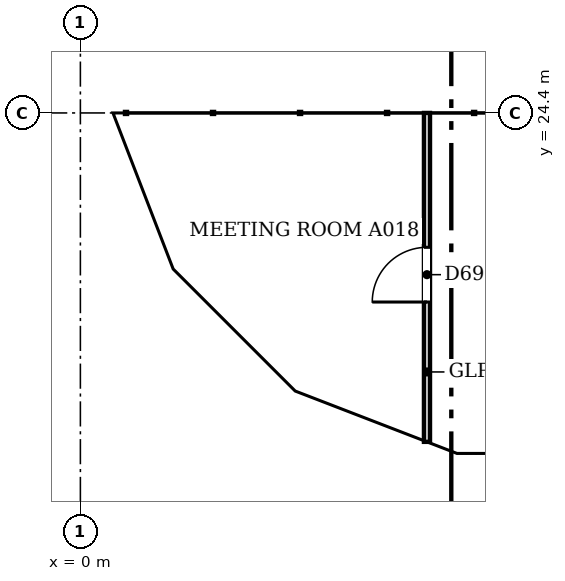
"""IFC4 building model, lengths in metres.
Left out: names, types, materials, properties, quantities, classifications, styles, units other than length and angle.
Written with IfcOpenShell. Run it as: python <this file> out.ifc"""

import sys

from ifc_helpers import new_model, si_unit, direction, frame, frame_2d, origin, place, context, subcontext, project, spatial, polyline, rectangle, outline, extrude, faceted_brep, source, transform, mapped, element, fill, save


model = new_model("IFC4")
c1 = context("Model", 3, precision=1e-05, world=origin(), true_north=direction((0.0, 1.0)))
c2 = subcontext(c1, "Body", "Model", "MODEL_VIEW")
j1 = project(units=[si_unit("LENGTHUNIT", "METRE"), si_unit("PLANEANGLEUNIT", "RADIAN")], contexts=[c1])
p1 = place(None, origin())
s1 = spatial("IfcSite", under=j1, at=p1, CompositionType="ELEMENT")
p2 = place(p1, origin())
s2 = spatial("IfcBuilding", under=s1, at=p2, CompositionType="ELEMENT")
p3 = place(p2, frame((0.0, 0.0, 41.0)))
s3 = spatial("IfcBuildingStorey", under=s2, at=p3, CompositionType="ELEMENT", Elevation=41.0)
m1 = source(origin(), c2, "Body", "Brep", [
    faceted_brep([(3.05, -0.25, 0.0), (6.053, -0.25, 3.8), (3.05, -0.25, 7.6), (0.0, -0.25, 3.8), (0.0, 0.25, 3.8), (3.05, 0.25, 7.6), (6.007, 0.25, 3.859), (6.007, 0.25, 3.741), (3.05, 0.25, 0.0), (6.053, 0.0, 3.8)], [[[0, 1, 2, 3]], [[4, 5, 6, 7, 8]], [[8, 7, 9, 1, 0]], [[6, 5, 2, 1, 9]], [[5, 4, 3, 2]], [[4, 8, 0, 3]], [[9, 7, 6]]]),
])
p4 = place(p3, frame((0.25, 30.5, -3.8), z_axis=(0.0, 0.0, 1.0), x_axis=(0.0, -1.0, 0.0)))
e1 = element("IfcWall", 1, at=p4, inside=s3, PredefinedType="SOLIDWALL", context=c2, shape_type="MappedRepresentation", body=[
    mapped(m1, transform((0.0, 0.0, 0.0), scale=1.0)),
])
m2 = source(origin(), c2, "Body", "SweptSolid", [
    extrude(outline(polyline([(3.049, 0.401), (5.735, 3.8), (3.049, 7.199), (0.321, 3.8), (3.049, 0.401)])), frame((0.0, 0.26, 0.0), z_axis=(0.0, -1.0, 0.0), x_axis=(1.0, 0.0, 0.0)), (0.0, 0.0, 1.0), 0.52),
])
p5 = place(p4, origin())
e2 = element("IfcOpeningElement", 2, at=p5, cuts=e1, PredefinedType="OPENING", context=c2, shape_type="MappedRepresentation", body=[
    mapped(m2, transform((0.0, 0.0, 0.0), scale=1.0)),
])
m3 = source(origin(), c2, "Body", "Brep", [
    faceted_brep([(2.95, -0.25, 0.0), (3.003, -0.25, 0.068), (3.003, -0.25, 7.532), (2.95, -0.25, 7.6), (0.0, -0.25, 3.8), (0.047, 0.25, 3.86), (2.898, 0.25, 7.532), (2.898, 0.25, 0.068), (0.047, 0.25, 3.74), (2.95, 0.0, 0.0), (2.95, 0.0, 7.6), (0.0, 0.0, 3.8)], [[[0, 1, 2, 3, 4]], [[5, 6, 7, 8]], [[1, 0, 9]], [[10, 3, 2]], [[6, 5, 11, 4, 3, 10]], [[8, 7, 9, 0, 4, 11]], [[8, 11, 5]], [[1, 9, 7, 6, 10, 2]]]),
])
p6 = place(p3, frame((0.25, 24.447, -3.8), z_axis=(0.0, 0.0, 1.0), x_axis=(0.35992665181, -0.932980602862, 0.0)))
e3 = element("IfcWall", 3, at=p6, inside=s3, PredefinedType="SOLIDWALL", context=c2, shape_type="MappedRepresentation", body=[
    mapped(m3, transform((0.0, 0.0, 0.0), scale=1.0)),
])
m4 = source(origin(), c2, "Body", "SweptSolid", [
    extrude(outline(polyline([(2.75, 6.935), (0.316, 3.8), (2.75, 0.665), (2.75, 6.935)])), frame((0.0, 0.26, 0.0), z_axis=(0.0, -1.0, 0.0), x_axis=(1.0, 0.0, 0.0)), (0.0, 0.0, 1.0), 0.52),
])
p7 = place(p6, origin())
e4 = element("IfcOpeningElement", 4, at=p7, cuts=e3, PredefinedType="OPENING", context=c2, shape_type="MappedRepresentation", body=[
    mapped(m4, transform((0.0, 0.0, 0.0), scale=1.0)),
])
m5 = source(origin(), c2, "Body", "Brep", [
    faceted_brep([(0.053, -0.25, 0.0), (2.997, -0.25, 3.8), (0.053, -0.25, 7.6), (0.0, -0.25, 7.532), (0.0, -0.25, 0.068), (0.106, 0.25, 7.532), (2.944, 0.25, 3.868), (2.944, 0.25, 3.732), (0.106, 0.25, 0.068), (2.997, 0.0, 3.8), (0.053, 0.0, 0.0), (0.053, 0.0, 7.6)], [[[0, 1, 2, 3, 4]], [[5, 6, 7, 8]], [[8, 7, 9, 1, 0, 10]], [[6, 5, 11, 2, 1, 9]], [[3, 2, 11]], [[10, 0, 4]], [[8, 10, 4, 3, 11, 5]], [[9, 7, 6]]]),
])
p8 = place(p3, frame((1.274, 21.731, -3.8), z_axis=(0.0, 0.0, 1.0), x_axis=(0.707147509625, -0.707066050402, 0.0)))
e5 = element("IfcWall", 5, at=p8, inside=s3, PredefinedType="SOLIDWALL", context=c2, shape_type="MappedRepresentation", body=[
    mapped(m5, transform((0.0, 0.0, 0.0), scale=1.0)),
])
m6 = source(origin(), c2, "Body", "SweptSolid", [
    extrude(outline(polyline([(0.253, 0.666), (2.681, 3.8), (0.253, 6.934), (0.253, 0.666)])), frame((0.0, 0.26, 0.0), z_axis=(0.0, -1.0, 0.0), x_axis=(1.0, 0.0, 0.0)), (0.0, 0.0, 1.0), 0.52),
])
p9 = place(p8, origin())
e6 = element("IfcOpeningElement", 6, at=p9, cuts=e5, PredefinedType="OPENING", context=c2, shape_type="MappedRepresentation", body=[
    mapped(m6, transform((0.0, 0.0, 0.0), scale=1.0)),
])
m7 = source(origin(), c2, "Body", "Brep", [
    faceted_brep([(2.95, -0.25, 0.0), (2.997, -0.25, 0.059), (2.997, -0.25, 7.541), (2.95, -0.25, 7.6), (0.0, -0.25, 3.8), (0.053, 0.25, 3.868), (2.904, 0.25, 7.54), (2.904, 0.25, 0.06), (0.053, 0.25, 3.732), (2.95, 0.0, 0.0), (2.95, 0.0, 7.6), (0.0, 0.0, 3.8)], [[[0, 1, 2, 3, 4]], [[5, 6, 7, 8]], [[1, 0, 9]], [[10, 3, 2]], [[6, 5, 11, 4, 3, 10]], [[8, 7, 9, 0, 4, 11]], [[8, 11, 5]], [[1, 9, 7, 6, 10, 2]]]),
])
p10 = place(p3, frame((3.394, 19.612, -3.8), z_axis=(0.0, 0.0, 1.0), x_axis=(0.932990326376, -0.359901446078, 0.0)))
e7 = element("IfcWall", 7, at=p10, inside=s3, PredefinedType="SOLIDWALL", context=c2, shape_type="MappedRepresentation", body=[
    mapped(m7, transform((0.0, 0.0, 0.0), scale=1.0)),
])
p11 = place(p10, origin())
e8 = element("IfcOpeningElement", 8, at=p11, cuts=e7, PredefinedType="OPENING", context=c2, shape_type="MappedRepresentation", body=[
    mapped(m4, transform((0.0, 0.0, 0.0), scale=1.0)),
])
m8 = source(origin(), c2, "Body", "Brep", [
    faceted_brep([(0.047, -0.25, 0.0), (3.05, -0.25, 3.8), (0.047, -0.25, 7.6), (0.0, -0.25, 7.54), (0.0, -0.25, 0.06), (0.093, 0.25, 7.541), (3.05, 0.25, 3.8), (0.093, 0.25, 0.059), (0.047, 0.0, 0.0), (0.047, 0.0, 7.6)], [[[0, 1, 2, 3, 4]], [[5, 6, 7]], [[7, 6, 1, 0, 8]], [[6, 5, 9, 2, 1]], [[3, 2, 9]], [[8, 0, 4]], [[7, 8, 4, 3, 9, 5]]]),
])
p12 = place(p3, frame((6.1, 18.55, -3.8), z_axis=(0.0, 0.0, 1.0), x_axis=(1.0, 0.0, 0.0)))
e9 = element("IfcWall", 9, at=p12, inside=s3, PredefinedType="SOLIDWALL", context=c2, shape_type="MappedRepresentation", body=[
    mapped(m8, transform((0.0, 0.0, 0.0), scale=1.0)),
])
m9 = source(origin(), c2, "Body", "SweptSolid", [
    extrude(outline(polyline([(0.247, 0.656), (2.731, 3.8), (0.247, 6.944), (0.247, 0.656)])), frame((0.0, 0.26, 0.0), z_axis=(0.0, -1.0, 0.0), x_axis=(1.0, 0.0, 0.0)), (0.0, 0.0, 1.0), 0.52),
])
p13 = place(p12, origin())
e10 = element("IfcOpeningElement", 10, at=p13, cuts=e9, PredefinedType="OPENING", context=c2, shape_type="MappedRepresentation", body=[
    mapped(m9, transform((0.0, 0.0, 0.0), scale=1.0)),
])
p14 = place(p2, frame((0.0, 0.0, 44.8)))
s4 = spatial("IfcBuildingStorey", under=s2, at=p14, CompositionType="ELEMENT", Elevation=44.8)
m10 = source(origin(), c2, "Body", "Brep", [
    faceted_brep([(3.003, -0.25, 0.0), (3.05, -0.25, 0.06), (3.05, -0.25, 7.54), (3.003, -0.25, 7.6), (0.0, -0.25, 3.8), (0.0, 0.25, 3.8), (2.957, 0.25, 7.541), (2.957, 0.25, 0.059), (3.003, 0.0, 0.0), (3.003, 0.0, 7.6)], [[[0, 1, 2, 3, 4]], [[5, 6, 7]], [[1, 0, 8]], [[9, 3, 2]], [[6, 5, 4, 3, 9]], [[5, 7, 8, 0, 4]], [[1, 8, 7, 6, 9, 2]]]),
])
p15 = place(p14, frame((0.25, 27.45, -3.8), z_axis=(0.0, 0.0, 1.0), x_axis=(0.0, -1.0, 0.0)))
e11 = element("IfcWall", 11, at=p15, inside=s4, PredefinedType="SOLIDWALL", context=c2, shape_type="MappedRepresentation", body=[
    mapped(m10, transform((0.0, 0.0, 0.0), scale=1.0)),
])
m11 = source(origin(), c2, "Body", "SweptSolid", [
    extrude(outline(polyline([(2.803, 6.944), (0.319, 3.8), (2.803, 0.656), (2.803, 6.944)])), frame((0.0, 0.26, 0.0), z_axis=(0.0, -1.0, 0.0), x_axis=(1.0, 0.0, 0.0)), (0.0, 0.0, 1.0), 0.52),
])
p16 = place(p15, origin())
e12 = element("IfcOpeningElement", 12, at=p16, cuts=e11, PredefinedType="OPENING", context=c2, shape_type="MappedRepresentation", body=[
    mapped(m11, transform((0.0, 0.0, 0.0), scale=1.0)),
])
m12 = source(origin(), c2, "Body", "Brep", [
    faceted_brep([(0.047, -0.25, 0.0), (2.997, -0.25, 3.8), (0.047, -0.25, 7.6), (0.0, -0.25, 7.541), (0.0, -0.25, 0.059), (0.093, 0.25, 7.54), (2.944, 0.25, 3.868), (2.944, 0.25, 3.732), (0.093, 0.25, 0.06), (2.997, 0.0, 3.8), (0.047, 0.0, 0.0), (0.047, 0.0, 7.6)], [[[0, 1, 2, 3, 4]], [[5, 6, 7, 8]], [[8, 7, 9, 1, 0, 10]], [[6, 5, 11, 2, 1, 9]], [[3, 2, 11]], [[10, 0, 4]], [[8, 10, 4, 3, 11, 5]], [[9, 7, 6]]]),
])
p17 = place(p14, frame((0.233, 24.49, -3.8), z_axis=(0.0, 0.0, 1.0), x_axis=(0.359901446078, -0.932990326376, 0.0)))
e13 = element("IfcWall", 13, at=p17, inside=s4, PredefinedType="SOLIDWALL", context=c2, shape_type="MappedRepresentation", body=[
    mapped(m12, transform((0.0, 0.0, 0.0), scale=1.0)),
])
m13 = source(origin(), c2, "Body", "SweptSolid", [
    extrude(outline(polyline([(0.247, 0.665), (2.681, 3.8), (0.247, 6.935), (0.247, 0.665)])), frame((0.0, 0.26, 0.0), z_axis=(0.0, -1.0, 0.0), x_axis=(1.0, 0.0, 0.0)), (0.0, 0.0, 1.0), 0.52),
])
p18 = place(p17, origin())
e14 = element("IfcOpeningElement", 14, at=p18, cuts=e13, PredefinedType="OPENING", context=c2, shape_type="MappedRepresentation", body=[
    mapped(m13, transform((0.0, 0.0, 0.0), scale=1.0)),
])
m14 = source(origin(), c2, "Body", "Brep", [
    faceted_brep([(2.944, -0.25, 0.0), (2.997, -0.25, 0.068), (2.997, -0.25, 7.532), (2.944, -0.25, 7.6), (0.0, -0.25, 3.8), (0.053, 0.25, 3.868), (2.891, 0.25, 7.532), (2.891, 0.25, 0.068), (0.053, 0.25, 3.732), (2.944, 0.0, 0.0), (2.944, 0.0, 7.6), (0.0, 0.0, 3.8)], [[[0, 1, 2, 3, 4]], [[5, 6, 7, 8]], [[1, 0, 9]], [[10, 3, 2]], [[6, 5, 11, 4, 3, 10]], [[8, 7, 9, 0, 4, 11]], [[8, 11, 5]], [[1, 9, 7, 6, 10, 2]]]),
])
p19 = place(p14, frame((1.312, 21.694, -3.8), z_axis=(0.0, 0.0, 1.0), x_axis=(0.707066050402, -0.707147509625, 0.0)))
e15 = element("IfcWall", 15, at=p19, inside=s4, PredefinedType="SOLIDWALL", context=c2, shape_type="MappedRepresentation", body=[
    mapped(m14, transform((0.0, 0.0, 0.0), scale=1.0)),
])
m15 = source(origin(), c2, "Body", "SweptSolid", [
    extrude(outline(polyline([(2.744, 6.934), (0.316, 3.8), (2.744, 0.666), (2.744, 6.934)])), frame((0.0, 0.26, 0.0), z_axis=(0.0, -1.0, 0.0), x_axis=(1.0, 0.0, 0.0)), (0.0, 0.0, 1.0), 0.52),
])
p20 = place(p19, origin())
e16 = element("IfcOpeningElement", 16, at=p20, cuts=e15, PredefinedType="OPENING", context=c2, shape_type="MappedRepresentation", body=[
    mapped(m15, transform((0.0, 0.0, 0.0), scale=1.0)),
])
m16 = source(origin(), c2, "Body", "Brep", [
    faceted_brep([(0.053, -0.25, 0.0), (3.003, -0.25, 3.8), (0.053, -0.25, 7.6), (0.0, -0.25, 7.532), (0.0, -0.25, 0.068), (0.106, 0.25, 7.532), (2.957, 0.25, 3.86), (2.957, 0.25, 3.74), (0.106, 0.25, 0.068), (3.003, 0.0, 3.8), (0.053, 0.0, 0.0), (0.053, 0.0, 7.6)], [[[0, 1, 2, 3, 4]], [[5, 6, 7, 8]], [[8, 7, 9, 1, 0, 10]], [[6, 5, 11, 2, 1, 9]], [[3, 2, 11]], [[10, 0, 4]], [[8, 10, 4, 3, 11, 5]], [[9, 7, 6]]]),
])
p21 = place(p14, frame((3.344, 19.631, -3.8), z_axis=(0.0, 0.0, 1.0), x_axis=(0.933007896601, -0.359855894603, 0.0)))
e17 = element("IfcWall", 17, at=p21, inside=s4, PredefinedType="SOLIDWALL", context=c2, shape_type="MappedRepresentation", body=[
    mapped(m16, transform((0.0, 0.0, 0.0), scale=1.0)),
])
m17 = source(origin(), c2, "Body", "SweptSolid", [
    extrude(outline(polyline([(0.253, 0.665), (2.687, 3.8), (0.253, 6.935), (0.253, 0.665)])), frame((0.0, 0.26, 0.0), z_axis=(0.0, -1.0, 0.0), x_axis=(1.0, 0.0, 0.0)), (0.0, 0.0, 1.0), 0.52),
])
p22 = place(p21, origin())
e18 = element("IfcOpeningElement", 18, at=p22, cuts=e17, PredefinedType="OPENING", context=c2, shape_type="MappedRepresentation", body=[
    mapped(m17, transform((0.0, 0.0, 0.0), scale=1.0)),
])
m18 = source(origin(), c2, "Body", "Brep", [
    faceted_brep([(3.003, -0.25, 0.0), (6.053, -0.25, 3.8), (3.003, -0.25, 7.6), (0.0, -0.25, 3.8), (0.047, 0.25, 3.859), (3.003, 0.25, 7.6), (6.053, 0.25, 3.8), (3.003, 0.25, 0.0), (0.047, 0.25, 3.741), (0.0, 0.0, 3.8)], [[[0, 1, 2, 3]], [[4, 5, 6, 7, 8]], [[7, 6, 1, 0]], [[6, 5, 2, 1]], [[5, 4, 9, 3, 2]], [[8, 7, 0, 3, 9]], [[8, 9, 4]]]),
])
p23 = place(p14, frame((6.146, 18.55, -3.8), z_axis=(0.0, 0.0, 1.0), x_axis=(1.0, 0.0, 0.0)))
e19 = element("IfcWall", 19, at=p23, inside=s4, PredefinedType="SOLIDWALL", context=c2, shape_type="MappedRepresentation", body=[
    mapped(m18, transform((0.0, 0.0, 0.0), scale=1.0)),
])
m19 = source(origin(), c2, "Body", "SweptSolid", [
    extrude(outline(polyline([(3.005, 0.401), (5.733, 3.8), (3.005, 7.199), (0.319, 3.8), (3.005, 0.401)])), frame((0.0, 0.26, 0.0), z_axis=(0.0, -1.0, 0.0), x_axis=(1.0, 0.0, 0.0)), (0.0, 0.0, 1.0), 0.52),
])
p24 = place(p23, origin())
e20 = element("IfcOpeningElement", 20, at=p24, cuts=e19, PredefinedType="OPENING", context=c2, shape_type="MappedRepresentation", body=[
    mapped(m19, transform((0.0, 0.0, 0.0), scale=1.0)),
])
p25 = place(p3, frame((5.7, 18.99, 0.0), z_axis=(0.0, 0.0, 1.0), x_axis=(0.0, 1.0, 0.0)))
e21 = element("IfcWall", 21, at=p25, inside=s3, PredefinedType="PARTITIONING", context=c2, shape_type="SweptSolid", body=[
    extrude(rectangle(XDim=5.41, YDim=0.1, at=frame_2d((2.705, 0.0))), origin(), (0.0, 0.0, 1.0), 3.067),
])
m20 = source(origin(), c2, "Body", "SweptSolid", [
    extrude(rectangle(XDim=0.9, YDim=2.1, at=frame_2d((0.45, 1.05))), frame((0.0, 0.06, 0.0), z_axis=(0.0, -1.0, 0.0), x_axis=(1.0, 0.0, 0.0)), (0.0, 0.0, 1.0), 0.12),
])
p26 = place(p25, frame((2.3, 0.0, 0.0)))
e22 = element("IfcOpeningElement", 22, at=p26, cuts=e21, PredefinedType="OPENING", context=c2, shape_type="MappedRepresentation", body=[
    mapped(m20, transform((0.0, 0.0, 0.0), scale=1.0)),
])
m21 = source(origin(), c2, "Body", "SweptSolid", [
    extrude(rectangle(XDim=0.9, YDim=2.1, at=frame_2d((0.45, 1.05))), frame((0.0, 0.025, 0.0), z_axis=(0.0, -1.0, 0.0), x_axis=(1.0, 0.0, 0.0)), (0.0, 0.0, 1.0), 0.05),
])
p27 = place(p26, origin())
e23 = element("IfcDoor", 23, at=p27, inside=s3, OperationType="SINGLE_SWING_LEFT", PredefinedType="DOOR", context=c2, shape_type="MappedRepresentation", body=[
    mapped(m21, transform((0.0, 0.0, 0.0), scale=1.0)),
])
fill(e22, e23)
save(model, sys.argv[1])
